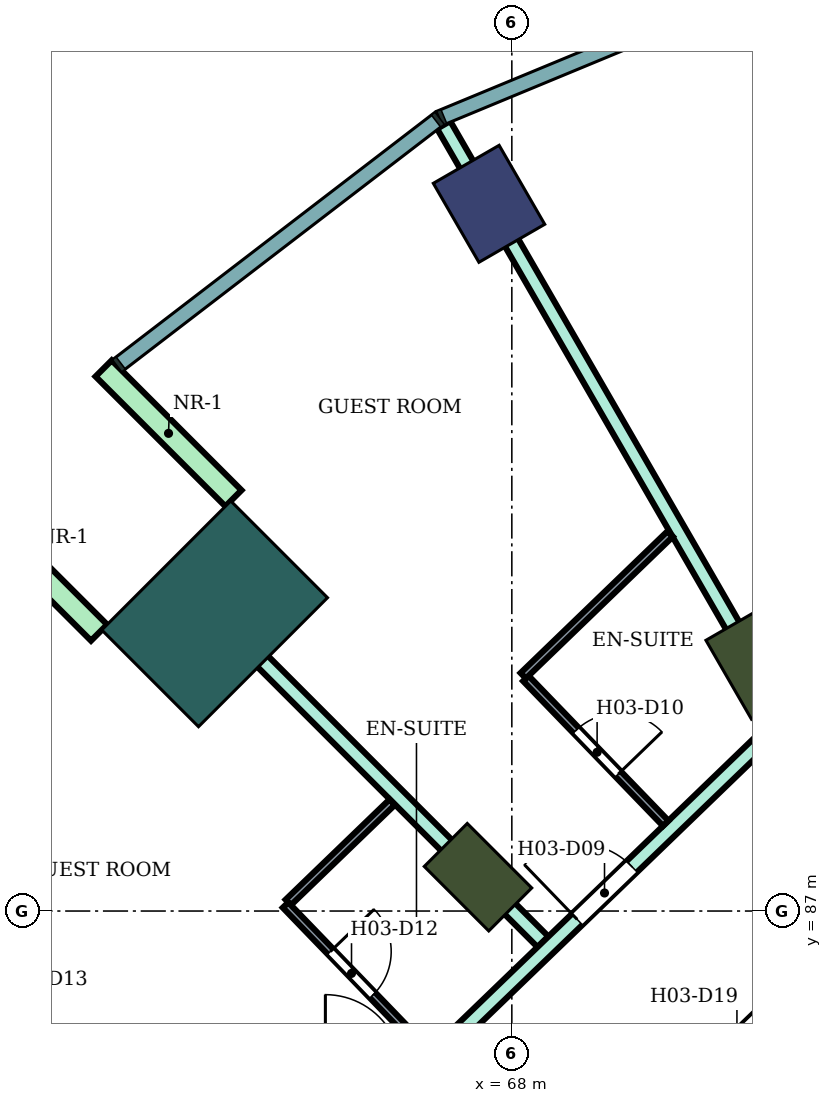
"""IFC4 building model, lengths in metres.
Left out: names, types, materials, properties, quantities, classifications, styles, units other than length and angle.
Written with IfcOpenShell. Run it as: python <this file> out.ifc"""

import sys

from ifc_helpers import new_model, si_unit, direction, frame, frame_2d, origin, origin_2d, place, context, subcontext, project, spatial, rectangle, extrude, element, fill, save


model = new_model("IFC4")
c1 = context("Model", 3, precision=1e-05, world=origin(), true_north=direction((0.0, 1.0)))
c2 = subcontext(c1, "Body", "Model", "MODEL_VIEW")
j1 = project(units=[si_unit("LENGTHUNIT", "METRE"), si_unit("PLANEANGLEUNIT", "RADIAN")], contexts=[c1])
p1 = place(None, origin())
s1 = spatial("IfcSite", under=j1, at=p1, CompositionType="ELEMENT")
p2 = place(p1, origin())
s2 = spatial("IfcBuilding", under=s1, at=p2, CompositionType="ELEMENT")
p3 = place(p2, frame((0.0, 0.0, 51.6)))
s3 = spatial("IfcBuildingStorey", under=s2, at=p3, CompositionType="ELEMENT", Elevation=51.6)
p4 = place(p3, frame((67.7, 96.304, 0.0), z_axis=(0.0, 0.0, 1.0), x_axis=(-0.5, 0.866025403784, 0.0)))
e1 = element("IfcColumn", 1, at=p4, inside=s3, PredefinedType="COLUMN", context=c2, shape_type="SweptSolid", body=[
    extrude(rectangle(XDim=1.2, YDim=1.0, at=origin_2d()), origin(), (0.0, 0.0, 1.0), 3.8),
])
for number, where, z_axis, x_axis in (
    (2, (71.2, 90.242, 0.0), (0.0, 0.0, 1.0), (-0.5, 0.866, 0.0)),
    (3, (67.555, 87.445, 0.0), (0.0, 0.0, 1.0), (-0.707, 0.707, 0.0)),
):
    element("IfcColumn", number, at=place(p3, frame(where, z_axis=z_axis, x_axis=x_axis)), inside=s3, PredefinedType="COLUMN", context=c2, shape_type="SweptSolid", body=[
        extrude(rectangle(XDim=1.2, YDim=0.8, at=origin_2d()), origin(), (0.0, 0.0, 1.0), 3.8),
    ])
p5 = place(p3, frame((64.09, 90.91, 0.0), z_axis=(0.0, 0.0, 1.0), x_axis=(-0.707106781187, 0.707106781187, 0.0)))
e4 = element("IfcColumn", 4, at=p5, inside=s3, PredefinedType="COLUMN", context=c2, shape_type="SweptSolid", body=[
    extrude(rectangle(XDim=1.8, YDim=2.4, at=origin_2d()), origin(), (0.0, 0.0, 1.0), 3.8),
])
for number, where, z_axis, x_axis in (
    (5, (64.338, 92.43, 0.0), (0.0, 0.0, 1.0), (-0.707, 0.707, 0.0)),
    (6, (62.57, 90.662, 0.0), (0.0, 0.0, 1.0), (-0.707, 0.707, 0.0)),
):
    element("IfcWall", number, at=place(p3, frame(where, z_axis=z_axis, x_axis=x_axis)), inside=s3, PredefinedType="NOTDEFINED", context=c2, shape_type="SweptSolid", body=[
        extrude(rectangle(XDim=2.416, YDim=0.3, at=frame_2d((1.208, 0.0))), origin(), (0.0, 0.0, 1.0), 3.8),
    ])
p6 = place(p3, frame((63.598, 91.408, 0.0), z_axis=(0.0, 0.0, 1.0), x_axis=(0.706999146394, -0.707214399597, 0.0)))
e7 = element("IfcWall", 7, at=p6, inside=s3, PredefinedType="PARTITIONING", context=c2, shape_type="SweptSolid", body=[
    extrude(rectangle(XDim=6.805, YDim=0.2, at=frame_2d((3.403, 0.0))), origin(), (0.0, 0.0, 1.0), 3.35),
])
p7 = place(p3, frame((66.797, 84.9, 0.0), z_axis=(0.0, 0.0, 1.0), x_axis=(0.719692092412, 0.694293376116, 0.0)))
e8 = element("IfcWall", 8, at=p7, inside=s3, PredefinedType="PARTITIONING", context=c2, shape_type="SweptSolid", body=[
    extrude(rectangle(XDim=6.584, YDim=0.2, at=frame_2d((3.292, 0.0))), origin(), (0.0, 0.0, 1.0), 3.35),
])
p8 = place(p7, frame((2.866, 0.0, 0.0)))
e9 = element("IfcOpeningElement", 9, at=p8, cuts=e8, PredefinedType="OPENING", context=c2, shape_type="SweptSolid", body=[
    extrude(rectangle(XDim=1.0, YDim=2.1, at=frame_2d((0.5, 1.05))), frame((0.0, 0.11, 0.0), z_axis=(0.0, -1.0, 0.0), x_axis=(1.0, 0.0, 0.0)), (0.0, 0.0, 1.0), 0.22),
])
p9 = place(p3, frame((67.103, 97.342, 0.0), z_axis=(0.0, 0.0, 1.0), x_axis=(0.499906738326, -0.866079241742, 0.0)))
e10 = element("IfcWall", 10, at=p9, inside=s3, PredefinedType="PARTITIONING", context=c2, shape_type="SweptSolid", body=[
    extrude(rectangle(XDim=8.907, YDim=0.2, at=frame_2d((4.454, 0.0))), origin(), (0.0, 0.0, 1.0), 3.35),
])
p10 = place(p3, frame((68.987, 83.4, 0.0), z_axis=(0.0, 0.0, 1.0), x_axis=(0.719547721855, 0.694442996922, 0.0)))
e11 = element("IfcWall", 11, at=p10, inside=s3, PredefinedType="PARTITIONING", context=c2, shape_type="SweptSolid", body=[
    extrude(rectangle(XDim=5.378, YDim=0.2, at=frame_2d((2.689, 0.0))), origin(), (0.0, 0.0, 1.0), 3.35),
])
p11 = place(p10, frame((2.294, 0.0, 0.0)))
e12 = element("IfcOpeningElement", 12, at=p11, cuts=e11, PredefinedType="OPENING", context=c2, shape_type="SweptSolid", body=[
    extrude(rectangle(XDim=0.9, YDim=2.1, at=frame_2d((0.45, 1.05))), frame((0.0, 0.11, 0.0), z_axis=(0.0, -1.0, 0.0), x_axis=(1.0, 0.0, 0.0)), (0.0, 0.0, 1.0), 0.22),
])
p12 = place(p3, frame((57.659, 87.899, 0.0), z_axis=(0.0, 0.0, 1.0), x_axis=(0.86602264145, -0.500004784474, 0.0)))
e13 = element("IfcWall", 13, at=p12, inside=s3, PredefinedType="PARTITIONING", context=c2, shape_type="SweptSolid", body=[
    extrude(rectangle(XDim=8.708, YDim=0.1, at=frame_2d((4.354, 0.0))), origin(), (0.0, 0.0, 1.0), 3.35),
])
p13 = place(p12, frame((3.929, 0.0, 0.0)))
e14 = element("IfcOpeningElement", 14, at=p13, cuts=e13, PredefinedType="OPENING", context=c2, shape_type="SweptSolid", body=[
    extrude(rectangle(XDim=0.9, YDim=2.1, at=frame_2d((0.45, 1.05))), frame((0.0, 0.06, 0.0), z_axis=(0.0, -1.0, 0.0), x_axis=(1.0, 0.0, 0.0)), (0.0, 0.0, 1.0), 0.12),
])
p14 = place(p3, frame((65.059, 87.114, 0.0), z_axis=(0.0, 0.0, 1.0), x_axis=(0.719715847356, 0.694268751324, 0.0)))
e15 = element("IfcWall", 15, at=p14, inside=s3, PredefinedType="PARTITIONING", context=c2, shape_type="SweptSolid", body=[
    extrude(rectangle(XDim=1.9, YDim=0.1, at=frame_2d((0.95, 0.0))), origin(), (0.0, 0.0, 1.0), 3.35),
])
p15 = place(p3, frame((65.023, 87.079, 0.0), z_axis=(0.0, 0.0, 1.0), x_axis=(0.694287838235, -0.719697434815, 0.0)))
e16 = element("IfcWall", 16, at=p15, inside=s3, PredefinedType="PARTITIONING", context=c2, shape_type="SweptSolid", body=[
    extrude(rectangle(XDim=2.7, YDim=0.1, at=frame_2d((1.35, 0.0))), origin(), (0.0, 0.0, 1.0), 3.35),
])
p16 = place(p15, frame((0.85, 0.0, 0.0)))
e17 = element("IfcOpeningElement", 17, at=p16, cuts=e16, PredefinedType="OPENING", context=c2, shape_type="SweptSolid", body=[
    extrude(rectangle(XDim=0.8, YDim=2.1, at=frame_2d((0.4, 1.05))), frame((0.0, 0.06, 0.0), z_axis=(0.0, -1.0, 0.0), x_axis=(1.0, 0.0, 0.0)), (0.0, 0.0, 1.0), 0.12),
])
p17 = place(p3, frame((68.185, 90.06, 0.0), z_axis=(0.0, 0.0, 1.0), x_axis=(0.69446127412, -0.719530081892, 0.0)))
e18 = element("IfcWall", 18, at=p17, inside=s3, PredefinedType="PARTITIONING", context=c2, shape_type="SweptSolid", body=[
    extrude(rectangle(XDim=2.649, YDim=0.1, at=frame_2d((1.324, 0.0))), origin(), (0.0, 0.0, 1.0), 3.35),
])
p18 = place(p17, frame((0.95, 0.0, 0.0)))
e19 = element("IfcOpeningElement", 19, at=p18, cuts=e18, PredefinedType="OPENING", context=c2, shape_type="SweptSolid", body=[
    extrude(rectangle(XDim=0.8, YDim=2.1, at=frame_2d((0.4, 1.05))), frame((0.0, 0.06, 0.0), z_axis=(0.0, -1.0, 0.0), x_axis=(1.0, 0.0, 0.0)), (0.0, 0.0, 1.0), 0.12),
])
p19 = place(p3, frame((68.15, 90.096, 0.0), z_axis=(0.0, 0.0, 1.0), x_axis=(0.719667544954, 0.694318820672, 0.0)))
e20 = element("IfcWall", 20, at=p19, inside=s3, PredefinedType="PARTITIONING", context=c2, shape_type="SweptSolid", body=[
    extrude(rectangle(XDim=2.687, YDim=0.1, at=frame_2d((1.344, 0.0))), origin(), (0.0, 0.0, 1.0), 3.35),
])
p20 = place(p8, origin())
e21 = element("IfcDoor", 21, at=p20, inside=s3, OperationType="SINGLE_SWING_LEFT", PredefinedType="DOOR", context=c2, shape_type="SweptSolid", body=[
    extrude(rectangle(XDim=1.0, YDim=2.1, at=frame_2d((0.5, 1.05))), frame((0.0, 0.025, 0.0), z_axis=(0.0, -1.0, 0.0), x_axis=(1.0, 0.0, 0.0)), (0.0, 0.0, 1.0), 0.05),
])
fill(e9, e21)
p21 = place(p18, origin())
e22 = element("IfcDoor", 22, at=p21, inside=s3, OperationType="SINGLE_SWING_RIGHT", PredefinedType="DOOR", context=c2, shape_type="SweptSolid", body=[
    extrude(rectangle(XDim=0.8, YDim=2.1, at=frame_2d((0.4, 1.05))), frame((0.0, 0.025, 0.0), z_axis=(0.0, -1.0, 0.0), x_axis=(1.0, 0.0, 0.0)), (0.0, 0.0, 1.0), 0.05),
])
fill(e19, e22)
p22 = place(p16, origin())
e23 = element("IfcDoor", 23, at=p22, inside=s3, OperationType="SINGLE_SWING_LEFT", PredefinedType="DOOR", context=c2, shape_type="SweptSolid", body=[
    extrude(rectangle(XDim=0.8, YDim=2.1, at=frame_2d((0.4, 1.05))), frame((0.0, 0.025, 0.0), z_axis=(0.0, -1.0, 0.0), x_axis=(1.0, 0.0, 0.0)), (0.0, 0.0, 1.0), 0.05),
])
fill(e17, e23)
p23 = place(p11, frame((0.9, 0.0, 0.0), z_axis=(0.0, 0.0, 1.0), x_axis=(-1.0, 0.0, 0.0)))
e24 = element("IfcDoor", 24, at=p23, inside=s3, OperationType="SINGLE_SWING_RIGHT", PredefinedType="DOOR", context=c2, shape_type="SweptSolid", body=[
    extrude(rectangle(XDim=0.9, YDim=2.1, at=frame_2d((0.45, 1.05))), frame((0.0, 0.025, 0.0), z_axis=(0.0, -1.0, 0.0), x_axis=(1.0, 0.0, 0.0)), (0.0, 0.0, 1.0), 0.05),
])
fill(e12, e24)
save(model, sys.argv[1])
